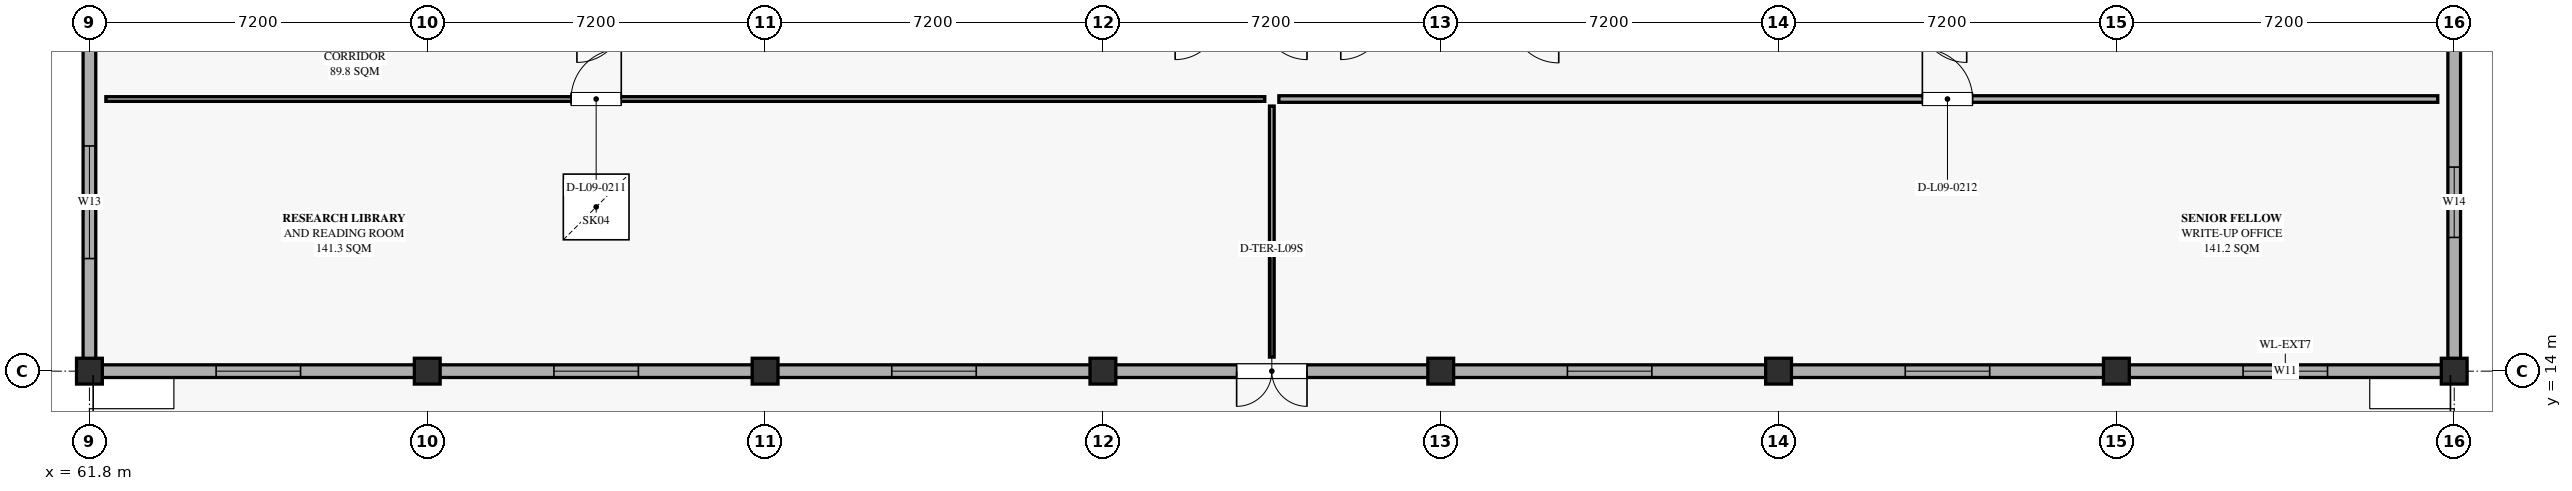
"""IFC4 building model, lengths in metres.
Left out: names, types, materials, properties, quantities, classifications, styles, units other than length and angle.
Written with IfcOpenShell. Run it as: python <this file> out.ifc"""

import sys

from ifc_helpers import new_model, si_unit, direction, frame, frame_2d, origin, origin_2d, place, context, subcontext, project, spatial, rectangle, extrude, element, fill, save


model = new_model("IFC4")
c1 = context("Model", 3, precision=1e-05, world=origin(), true_north=direction((0.0, 1.0)))
c2 = subcontext(c1, "Body", "Model", "MODEL_VIEW")
j1 = project(units=[si_unit("LENGTHUNIT", "METRE"), si_unit("PLANEANGLEUNIT", "RADIAN")], contexts=[c1])
p1 = place(None, origin())
s1 = spatial("IfcSite", under=j1, at=p1, CompositionType="ELEMENT")
p2 = place(p1, origin())
s2 = spatial("IfcBuilding", under=s1, at=p2, CompositionType="ELEMENT")
p3 = place(p2, frame((0.0, 0.0, 41.94)))
s3 = spatial("IfcBuildingStorey", under=s2, at=p3, CompositionType="ELEMENT", Elevation=41.94)
for number, where, z_axis, x_axis in (
    (1, (61.8, 14.0, 0.0), (0.0, 0.0, 1.0), (1.0, 0.0, 0.0)),
    (2, (69.0, 14.0, 0.0), (0.0, 0.0, 1.0), (1.0, 0.0, 0.0)),
    (3, (76.2, 14.0, 0.0), (0.0, 0.0, 1.0), (1.0, 0.0, 0.0)),
    (4, (83.4, 14.0, 0.0), (0.0, 0.0, 1.0), (1.0, 0.0, 0.0)),
    (5, (90.6, 14.0, 0.0), (0.0, 0.0, 1.0), (1.0, 0.0, 0.0)),
    (6, (97.8, 14.0, 0.0), (0.0, 0.0, 1.0), (1.0, 0.0, 0.0)),
    (7, (105.0, 14.0, 0.0), (0.0, 0.0, 1.0), (1.0, 0.0, 0.0)),
    (8, (112.2, 14.0, 0.0), (0.0, 0.0, 1.0), (1.0, 0.0, 0.0)),
):
    element("IfcColumn", number, at=place(p3, frame(where, z_axis=z_axis, x_axis=x_axis)), inside=s3, PredefinedType="COLUMN", context=c2, shape_type="SweptSolid", body=[
        extrude(rectangle(XDim=0.55, YDim=0.55, at=origin_2d()), origin(), (0.0, 0.0, 1.0), 4.32),
    ])
p4 = place(p3, frame((111.94, 14.0, 0.0), z_axis=(0.0, 0.0, 1.0), x_axis=(-1.0, 0.0, 0.0)))
e9 = element("IfcWall", 9, at=p4, inside=s3, PredefinedType="SOLIDWALL", context=c2, shape_type="SweptSolid", body=[
    extrude(rectangle(XDim=6.68, YDim=0.27, at=frame_2d((3.34, 0.0))), origin(), (0.0, 0.0, 1.0), 2.82),
])
p5 = place(p4, frame((2.44, 0.0, 0.85)))
e10 = element("IfcOpeningElement", 10, at=p5, cuts=e9, PredefinedType="OPENING", context=c2, shape_type="SweptSolid", body=[
    extrude(rectangle(XDim=1.8, YDim=1.8, at=frame_2d((0.9, 0.9))), frame((0.0, 0.145, 0.0), z_axis=(0.0, -1.0, 0.0), x_axis=(1.0, 0.0, 0.0)), (0.0, 0.0, 1.0), 0.29),
])
p6 = place(p3, frame((104.74, 14.0, 0.0), z_axis=(0.0, 0.0, 1.0), x_axis=(-1.0, 0.0, 0.0)))
e11 = element("IfcWall", 11, at=p6, inside=s3, PredefinedType="SOLIDWALL", context=c2, shape_type="SweptSolid", body=[
    extrude(rectangle(XDim=6.68, YDim=0.27, at=frame_2d((3.34, 0.0))), origin(), (0.0, 0.0, 1.0), 2.82),
])
p7 = place(p6, frame((2.44, 0.0, 0.85)))
e12 = element("IfcOpeningElement", 12, at=p7, cuts=e11, PredefinedType="OPENING", context=c2, shape_type="SweptSolid", body=[
    extrude(rectangle(XDim=1.8, YDim=1.8, at=frame_2d((0.9, 0.9))), frame((0.0, 0.145, 0.0), z_axis=(0.0, -1.0, 0.0), x_axis=(1.0, 0.0, 0.0)), (0.0, 0.0, 1.0), 0.29),
])
p8 = place(p3, frame((97.54, 14.0, 0.0), z_axis=(0.0, 0.0, 1.0), x_axis=(-1.0, 0.0, 0.0)))
e13 = element("IfcWall", 13, at=p8, inside=s3, PredefinedType="SOLIDWALL", context=c2, shape_type="SweptSolid", body=[
    extrude(rectangle(XDim=6.68, YDim=0.27, at=frame_2d((3.34, 0.0))), origin(), (0.0, 0.0, 1.0), 2.82),
])
p9 = place(p8, frame((2.44, 0.0, 0.85)))
e14 = element("IfcOpeningElement", 14, at=p9, cuts=e13, PredefinedType="OPENING", context=c2, shape_type="SweptSolid", body=[
    extrude(rectangle(XDim=1.8, YDim=1.8, at=frame_2d((0.9, 0.9))), frame((0.0, 0.145, 0.0), z_axis=(0.0, -1.0, 0.0), x_axis=(1.0, 0.0, 0.0)), (0.0, 0.0, 1.0), 0.29),
])
p10 = place(p3, frame((90.34, 14.0, 0.0), z_axis=(0.0, 0.0, 1.0), x_axis=(-1.0, 0.0, 0.0)))
e15 = element("IfcWall", 15, at=p10, inside=s3, PredefinedType="SOLIDWALL", context=c2, shape_type="SweptSolid", body=[
    extrude(rectangle(XDim=6.68, YDim=0.27, at=frame_2d((3.34, 0.0))), origin(), (0.0, 0.0, 1.0), 2.82),
])
p11 = place(p10, frame((2.59, 0.0, 0.0)))
e16 = element("IfcOpeningElement", 16, at=p11, cuts=e15, PredefinedType="OPENING", context=c2, shape_type="SweptSolid", body=[
    extrude(rectangle(XDim=1.5, YDim=2.2, at=frame_2d((0.75, 1.1))), frame((0.0, 0.145, 0.0), z_axis=(0.0, -1.0, 0.0), x_axis=(1.0, 0.0, 0.0)), (0.0, 0.0, 1.0), 0.29),
])
p12 = place(p3, frame((83.14, 14.0, 0.0), z_axis=(0.0, 0.0, 1.0), x_axis=(-1.0, 0.0, 0.0)))
e17 = element("IfcWall", 17, at=p12, inside=s3, PredefinedType="SOLIDWALL", context=c2, shape_type="SweptSolid", body=[
    extrude(rectangle(XDim=6.68, YDim=0.27, at=frame_2d((3.34, 0.0))), origin(), (0.0, 0.0, 1.0), 2.82),
])
p13 = place(p12, frame((2.44, 0.0, 0.85)))
e18 = element("IfcOpeningElement", 18, at=p13, cuts=e17, PredefinedType="OPENING", context=c2, shape_type="SweptSolid", body=[
    extrude(rectangle(XDim=1.8, YDim=1.8, at=frame_2d((0.9, 0.9))), frame((0.0, 0.145, 0.0), z_axis=(0.0, -1.0, 0.0), x_axis=(1.0, 0.0, 0.0)), (0.0, 0.0, 1.0), 0.29),
])
p14 = place(p3, frame((75.94, 14.0, 0.0), z_axis=(0.0, 0.0, 1.0), x_axis=(-1.0, 0.0, 0.0)))
e19 = element("IfcWall", 19, at=p14, inside=s3, PredefinedType="SOLIDWALL", context=c2, shape_type="SweptSolid", body=[
    extrude(rectangle(XDim=6.68, YDim=0.27, at=frame_2d((3.34, 0.0))), origin(), (0.0, 0.0, 1.0), 2.82),
])
p15 = place(p14, frame((2.44, 0.0, 0.85)))
e20 = element("IfcOpeningElement", 20, at=p15, cuts=e19, PredefinedType="OPENING", context=c2, shape_type="SweptSolid", body=[
    extrude(rectangle(XDim=1.8, YDim=1.8, at=frame_2d((0.9, 0.9))), frame((0.0, 0.145, 0.0), z_axis=(0.0, -1.0, 0.0), x_axis=(1.0, 0.0, 0.0)), (0.0, 0.0, 1.0), 0.29),
])
p16 = place(p3, frame((68.74, 14.0, 0.0), z_axis=(0.0, 0.0, 1.0), x_axis=(-1.0, 0.0, 0.0)))
e21 = element("IfcWall", 21, at=p16, inside=s3, PredefinedType="SOLIDWALL", context=c2, shape_type="SweptSolid", body=[
    extrude(rectangle(XDim=6.68, YDim=0.27, at=frame_2d((3.34, 0.0))), origin(), (0.0, 0.0, 1.0), 2.82),
])
p17 = place(p16, frame((2.44, 0.0, 0.85)))
e22 = element("IfcOpeningElement", 22, at=p17, cuts=e21, PredefinedType="OPENING", context=c2, shape_type="SweptSolid", body=[
    extrude(rectangle(XDim=1.8, YDim=1.8, at=frame_2d((0.9, 0.9))), frame((0.0, 0.145, 0.0), z_axis=(0.0, -1.0, 0.0), x_axis=(1.0, 0.0, 0.0)), (0.0, 0.0, 1.0), 0.29),
])
p18 = place(p3, frame((61.8, 14.26, 0.0), z_axis=(0.0, 0.0, 1.0), x_axis=(0.0, 1.0, 0.0)))
e23 = element("IfcWall", 23, at=p18, inside=s3, PredefinedType="SOLIDWALL", context=c2, shape_type="SweptSolid", body=[
    extrude(rectangle(XDim=6.68, YDim=0.27, at=frame_2d((3.34, 0.0))), origin(), (0.0, 0.0, 1.0), 2.82),
])
p19 = place(p18, frame((2.14, 0.0, 0.85)))
e24 = element("IfcOpeningElement", 24, at=p19, cuts=e23, PredefinedType="OPENING", context=c2, shape_type="SweptSolid", body=[
    extrude(rectangle(XDim=2.4, YDim=1.8, at=frame_2d((1.2, 0.9))), frame((0.0, 0.145, 0.0), z_axis=(0.0, -1.0, 0.0), x_axis=(1.0, 0.0, 0.0)), (0.0, 0.0, 1.0), 0.29),
])
p20 = place(p3, frame((112.2, 20.94, 0.0), z_axis=(0.0, 0.0, 1.0), x_axis=(0.0, -1.0, 0.0)))
e25 = element("IfcWall", 25, at=p20, inside=s3, PredefinedType="SOLIDWALL", context=c2, shape_type="SweptSolid", body=[
    extrude(rectangle(XDim=6.68, YDim=0.27, at=frame_2d((3.34, 0.0))), origin(), (0.0, 0.0, 1.0), 2.82),
])
p21 = place(p20, frame((2.59, 0.0, 0.85)))
e26 = element("IfcOpeningElement", 26, at=p21, cuts=e25, PredefinedType="OPENING", context=c2, shape_type="SweptSolid", body=[
    extrude(rectangle(XDim=1.5, YDim=1.8, at=frame_2d((0.75, 0.9))), frame((0.0, 0.145, 0.0), z_axis=(0.0, -1.0, 0.0), x_axis=(1.0, 0.0, 0.0)), (0.0, 0.0, 1.0), 0.29),
])
p22 = place(p3, frame((62.15, 19.8, 0.0), z_axis=(0.0, 0.0, 1.0), x_axis=(1.0, 0.0, 0.0)))
e27 = element("IfcWall", 27, at=p22, inside=s3, PredefinedType="PARTITIONING", context=c2, shape_type="SweptSolid", body=[
    extrude(rectangle(XDim=24.7, YDim=0.1, at=frame_2d((12.35, 0.0))), origin(), (0.0, 0.0, 1.0), 2.8),
])
p23 = place(p22, frame((9.915, 0.0, 0.0)))
e28 = element("IfcOpeningElement", 28, at=p23, cuts=e27, PredefinedType="OPENING", context=c2, shape_type="SweptSolid", body=[
    extrude(rectangle(XDim=1.07, YDim=2.05, at=frame_2d((0.535, 1.025))), frame((0.0, 0.06, 0.0), z_axis=(0.0, -1.0, 0.0), x_axis=(1.0, 0.0, 0.0)), (0.0, 0.0, 1.0), 0.12),
])
p24 = place(p3, frame((87.0, 19.65, 0.0), z_axis=(0.0, 0.0, 1.0), x_axis=(0.0, -1.0, 0.0)))
e29 = element("IfcWall", 29, at=p24, inside=s3, PredefinedType="PARTITIONING", context=c2, shape_type="SweptSolid", body=[
    extrude(rectangle(XDim=5.35, YDim=0.1, at=frame_2d((2.675, 0.0))), origin(), (0.0, 0.0, 1.0), 2.8),
])
p25 = place(p3, frame((87.15, 19.8, 0.0), z_axis=(0.0, 0.0, 1.0), x_axis=(1.0, 0.0, 0.0)))
e30 = element("IfcWall", 30, at=p25, inside=s3, PredefinedType="PARTITIONING", context=c2, shape_type="SweptSolid", body=[
    extrude(rectangle(XDim=24.7, YDim=0.14, at=frame_2d((12.35, 0.0))), origin(), (0.0, 0.0, 1.0), 2.8),
])
p26 = place(p25, frame((13.715, 0.0, 0.0)))
e31 = element("IfcOpeningElement", 31, at=p26, cuts=e30, PredefinedType="OPENING", context=c2, shape_type="SweptSolid", body=[
    extrude(rectangle(XDim=1.07, YDim=2.1, at=frame_2d((0.535, 1.05))), frame((0.0, 0.08, 0.0), z_axis=(0.0, -1.0, 0.0), x_axis=(1.0, 0.0, 0.0)), (0.0, 0.0, 1.0), 0.16),
])
p27 = place(p5, origin())
e32 = element("IfcWindow", 32, at=p27, inside=s3, PartitioningType="DOUBLE_PANEL_VERTICAL", PredefinedType="WINDOW", context=c2, shape_type="SweptSolid", body=[
    extrude(rectangle(XDim=1.8, YDim=1.8, at=frame_2d((0.9, 0.9))), frame((0.0, 0.03, 0.0), z_axis=(0.0, -1.0, 0.0), x_axis=(1.0, 0.0, 0.0)), (0.0, 0.0, 1.0), 0.06),
])
fill(e10, e32)
p28 = place(p7, origin())
e33 = element("IfcWindow", 33, at=p28, inside=s3, PartitioningType="DOUBLE_PANEL_VERTICAL", PredefinedType="WINDOW", context=c2, shape_type="SweptSolid", body=[
    extrude(rectangle(XDim=1.8, YDim=1.8, at=frame_2d((0.9, 0.9))), frame((0.0, 0.03, 0.0), z_axis=(0.0, -1.0, 0.0), x_axis=(1.0, 0.0, 0.0)), (0.0, 0.0, 1.0), 0.06),
])
fill(e12, e33)
p29 = place(p9, origin())
e34 = element("IfcWindow", 34, at=p29, inside=s3, PartitioningType="DOUBLE_PANEL_VERTICAL", PredefinedType="WINDOW", context=c2, shape_type="SweptSolid", body=[
    extrude(rectangle(XDim=1.8, YDim=1.8, at=frame_2d((0.9, 0.9))), frame((0.0, 0.03, 0.0), z_axis=(0.0, -1.0, 0.0), x_axis=(1.0, 0.0, 0.0)), (0.0, 0.0, 1.0), 0.06),
])
fill(e14, e34)
p30 = place(p11, origin())
e35 = element("IfcDoor", 35, at=p30, inside=s3, OperationType="DOUBLE_DOOR_SINGLE_SWING", PredefinedType="DOOR", context=c2, shape_type="SweptSolid", body=[
    extrude(rectangle(XDim=1.5, YDim=2.2, at=frame_2d((0.75, 1.1))), frame((0.0, 0.025, 0.0), z_axis=(0.0, -1.0, 0.0), x_axis=(1.0, 0.0, 0.0)), (0.0, 0.0, 1.0), 0.05),
])
fill(e16, e35)
p31 = place(p13, origin())
e36 = element("IfcWindow", 36, at=p31, inside=s3, PartitioningType="DOUBLE_PANEL_VERTICAL", PredefinedType="WINDOW", context=c2, shape_type="SweptSolid", body=[
    extrude(rectangle(XDim=1.8, YDim=1.8, at=frame_2d((0.9, 0.9))), frame((0.0, 0.03, 0.0), z_axis=(0.0, -1.0, 0.0), x_axis=(1.0, 0.0, 0.0)), (0.0, 0.0, 1.0), 0.06),
])
fill(e18, e36)
p32 = place(p15, origin())
e37 = element("IfcWindow", 37, at=p32, inside=s3, PartitioningType="DOUBLE_PANEL_VERTICAL", PredefinedType="WINDOW", context=c2, shape_type="SweptSolid", body=[
    extrude(rectangle(XDim=1.8, YDim=1.8, at=frame_2d((0.9, 0.9))), frame((0.0, 0.03, 0.0), z_axis=(0.0, -1.0, 0.0), x_axis=(1.0, 0.0, 0.0)), (0.0, 0.0, 1.0), 0.06),
])
fill(e20, e37)
p33 = place(p17, origin())
e38 = element("IfcWindow", 38, at=p33, inside=s3, PartitioningType="DOUBLE_PANEL_VERTICAL", PredefinedType="WINDOW", context=c2, shape_type="SweptSolid", body=[
    extrude(rectangle(XDim=1.8, YDim=1.8, at=frame_2d((0.9, 0.9))), frame((0.0, 0.03, 0.0), z_axis=(0.0, -1.0, 0.0), x_axis=(1.0, 0.0, 0.0)), (0.0, 0.0, 1.0), 0.06),
])
fill(e22, e38)
p34 = place(p19, origin())
e39 = element("IfcWindow", 39, at=p34, inside=s3, PartitioningType="DOUBLE_PANEL_VERTICAL", PredefinedType="WINDOW", context=c2, shape_type="SweptSolid", body=[
    extrude(rectangle(XDim=2.4, YDim=1.8, at=frame_2d((1.2, 0.9))), frame((0.0, 0.03, 0.0), z_axis=(0.0, -1.0, 0.0), x_axis=(1.0, 0.0, 0.0)), (0.0, 0.0, 1.0), 0.06),
])
fill(e24, e39)
p35 = place(p21, origin())
e40 = element("IfcWindow", 40, at=p35, inside=s3, PartitioningType="SINGLE_PANEL", PredefinedType="WINDOW", context=c2, shape_type="SweptSolid", body=[
    extrude(rectangle(XDim=1.5, YDim=1.8, at=frame_2d((0.75, 0.9))), frame((0.0, 0.03, 0.0), z_axis=(0.0, -1.0, 0.0), x_axis=(1.0, 0.0, 0.0)), (0.0, 0.0, 1.0), 0.06),
])
fill(e26, e40)
p36 = place(p2, frame((0.0, 0.0, 46.26)))
p37 = place(p36, frame((0.0, 0.0, -0.255)))
p38 = place(p37, frame((72.6, 17.5, 0.0)))
p39 = place(p38, frame((0.0, 0.0, 0.205)))
e41 = element("IfcWindow", 41, at=p39, inside=s3, PartitioningType="SINGLE_PANEL", PredefinedType="SKYLIGHT", context=c2, shape_type="SweptSolid", body=[
    extrude(rectangle(XDim=1.4, YDim=1.4, at=origin_2d()), origin(), (0.0, 0.0, 1.0), 0.05),
])
p40 = place(p23, origin())
e42 = element("IfcDoor", 42, at=p40, inside=s3, OperationType="SINGLE_SWING_RIGHT", PredefinedType="DOOR", context=c2, shape_type="SweptSolid", body=[
    extrude(rectangle(XDim=1.07, YDim=2.05, at=frame_2d((0.535, 1.025))), frame((0.0, 0.025, 0.0), z_axis=(0.0, -1.0, 0.0), x_axis=(1.0, 0.0, 0.0)), (0.0, 0.0, 1.0), 0.05),
])
fill(e28, e42)
p41 = place(p26, origin())
e43 = element("IfcDoor", 43, at=p41, inside=s3, OperationType="SINGLE_SWING_LEFT", PredefinedType="DOOR", context=c2, shape_type="SweptSolid", body=[
    extrude(rectangle(XDim=1.07, YDim=2.1, at=frame_2d((0.535, 1.05))), frame((0.0, 0.025, 0.0), z_axis=(0.0, -1.0, 0.0), x_axis=(1.0, 0.0, 0.0)), (0.0, 0.0, 1.0), 0.05),
])
fill(e31, e43)
save(model, sys.argv[1])
